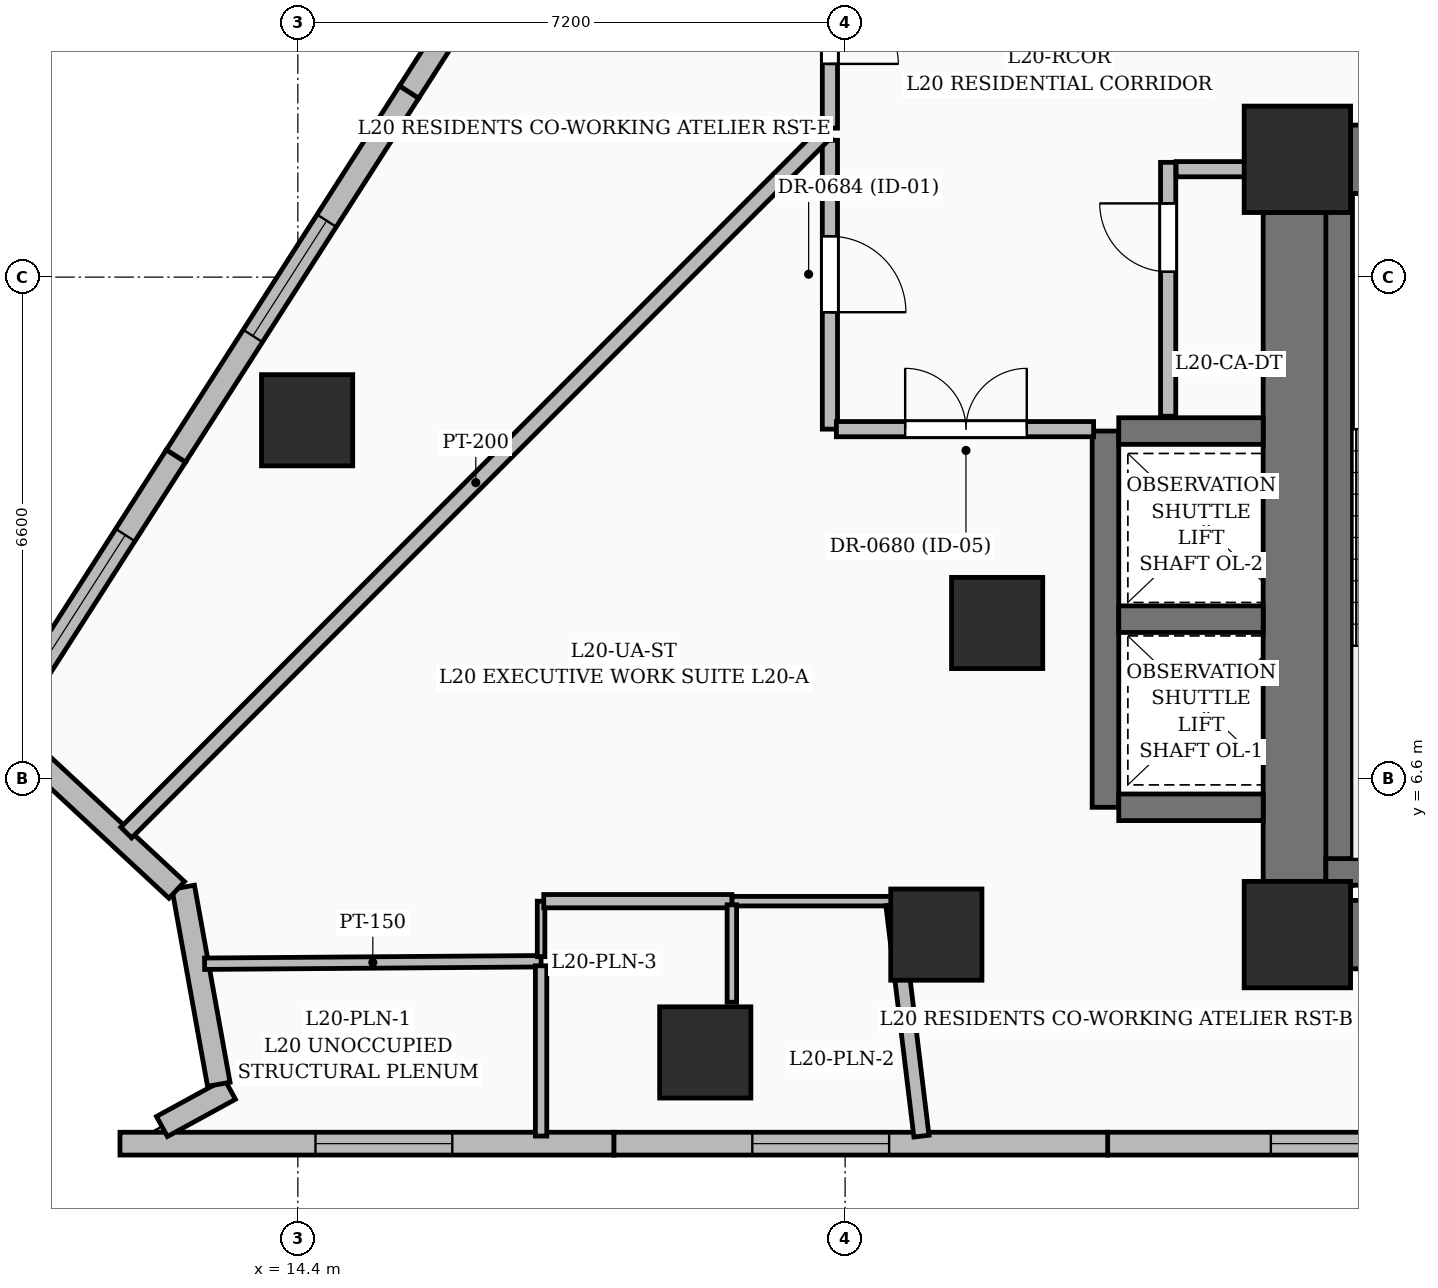
"""IFC4 building model, lengths in metres.
Left out: names, types, materials, properties, quantities, classifications, styles, units other than length and angle.
Written with IfcOpenShell. Run it as: python <this file> out.ifc"""

import sys

from ifc_helpers import new_model, si_unit, direction, frame, frame_2d, origin, origin_2d, place, context, subcontext, project, spatial, rectangle, extrude, element, fill, save


model = new_model("IFC4")
c1 = context("Model", 3, precision=1e-05, world=origin(), true_north=direction((0.0, 1.0)))
c2 = subcontext(c1, "Body", "Model", "MODEL_VIEW")
j1 = project(units=[si_unit("LENGTHUNIT", "METRE"), si_unit("PLANEANGLEUNIT", "RADIAN")], contexts=[c1])
p1 = place(None, origin())
s1 = spatial("IfcSite", under=j1, at=p1, CompositionType="ELEMENT")
p2 = place(p1, origin())
s2 = spatial("IfcBuilding", under=s1, at=p2, CompositionType="ELEMENT")
p3 = place(p2, frame((0.0, 0.0, 82.2)))
s3 = spatial("IfcBuildingStorey", under=s2, at=p3, CompositionType="ELEMENT", Elevation=82.2)
for number, where, z_axis, x_axis in (
    (1, (27.55, 4.55, 0.0), (0.0, 0.0, 1.0), (1.0, 0.0, 0.0)),
    (2, (27.55, 14.75, 0.0), (0.0, 0.0, 1.0), (1.0, 0.0, 0.0)),
):
    element("IfcColumn", number, at=place(p3, frame(where, z_axis=z_axis, x_axis=x_axis)), inside=s3, PredefinedType="COLUMN", context=c2, shape_type="SweptSolid", body=[
        extrude(rectangle(XDim=1.4, YDim=1.4, at=origin_2d()), origin(), (0.0, 0.0, 1.0), 3.6),
    ])
for number, where, z_axis, x_axis in (
    (3, (22.8, 4.55, 0.0), (0.0, 0.0, 1.0), (1.0, 0.0, 0.0)),
    (4, (23.6, 8.65, 0.0), (0.0, 0.0, 1.0), (1.0, 0.0, 0.0)),
):
    element("IfcColumn", number, at=place(p3, frame(where, z_axis=z_axis, x_axis=x_axis)), inside=s3, PredefinedType="COLUMN", context=c2, shape_type="SweptSolid", body=[
        extrude(rectangle(XDim=1.2, YDim=1.2, at=origin_2d()), origin(), (0.0, 0.0, 1.0), 3.6),
    ])
p4 = place(p3, frame((28.25, 4.55, 0.0), z_axis=(0.0, 0.0, 1.0), x_axis=(1.0, 0.0, 0.0)))
e5 = element("IfcWall", 5, at=p4, inside=s3, PredefinedType="SHEAR", context=c2, shape_type="SweptSolid", body=[
    extrude(rectangle(XDim=6.2, YDim=0.9, at=frame_2d((3.1, 0.0))), origin(), (0.0, 0.0, 1.0), 3.6),
])
p5 = place(p3, frame((28.25, 14.75, 0.0), z_axis=(0.0, 0.0, 1.0), x_axis=(1.0, 0.0, 0.0)))
e6 = element("IfcWall", 6, at=p5, inside=s3, PredefinedType="SHEAR", context=c2, shape_type="SweptSolid", body=[
    extrude(rectangle(XDim=6.2, YDim=0.9, at=frame_2d((3.1, 0.0))), origin(), (0.0, 0.0, 1.0), 3.6),
])
p6 = place(p5, frame((0.925, 0.0, 0.0)))
e7 = element("IfcOpeningElement", 7, at=p6, cuts=e6, PredefinedType="OPENING", context=c2, shape_type="SweptSolid", body=[
    extrude(rectangle(XDim=1.05, YDim=2.15, at=frame_2d((0.525, 1.075))), frame((0.0, 0.46, 0.0), z_axis=(0.0, -1.0, 0.0), x_axis=(1.0, 0.0, 0.0)), (0.0, 0.0, 1.0), 0.92),
])
p7 = place(p3, frame((27.55, 5.25, 0.0), z_axis=(0.0, 0.0, 1.0), x_axis=(0.0, 1.0, 0.0)))
e8 = element("IfcWall", 8, at=p7, inside=s3, PredefinedType="SHEAR", context=c2, shape_type="SweptSolid", body=[
    extrude(rectangle(XDim=8.8, YDim=0.9, at=frame_2d((4.4, 0.0))), origin(), (0.0, 0.0, 1.0), 3.6),
])
p8 = place(p3, frame((28.1, 5.2, 0.0), z_axis=(0.0, 0.0, 1.0), x_axis=(0.0, 1.0, 0.0)))
e9 = element("IfcWall", 9, at=p8, inside=s3, PredefinedType="SOLIDWALL", context=c2, shape_type="SweptSolid", body=[
    extrude(rectangle(XDim=9.1, YDim=0.35, at=frame_2d((4.55, 0.0))), origin(), (0.0, 0.0, 1.0), 3.6),
])
p9 = place(p3, frame((27.925, 5.375, 0.0), z_axis=(0.0, 0.0, 1.0), x_axis=(1.0, 0.0, 0.0)))
e10 = element("IfcWall", 10, at=p9, inside=s3, PredefinedType="SOLIDWALL", context=c2, shape_type="SweptSolid", body=[
    extrude(rectangle(XDim=3.55, YDim=0.35, at=frame_2d((1.775, 0.0))), origin(), (0.0, 0.0, 1.0), 3.6),
])
p10 = place(p3, frame((25.025, 6.225, 0.0), z_axis=(0.0, 0.0, 1.0), x_axis=(0.0, 1.0, 0.0)))
e11 = element("IfcWall", 11, at=p10, inside=s3, PredefinedType="SOLIDWALL", context=c2, shape_type="SweptSolid", body=[
    extrude(rectangle(XDim=4.95, YDim=0.35, at=frame_2d((2.475, 0.0))), origin(), (0.0, 0.0, 1.0), 3.6),
])
for number, where, z_axis, x_axis in (
    (12, (25.2, 6.225, 0.0), (0.0, 0.0, 1.0), (1.0, 0.0, 0.0)),
    (13, (25.2, 8.7, 0.0), (0.0, 0.0, 1.0), (1.0, 0.0, 0.0)),
    (14, (25.2, 11.175, 0.0), (0.0, 0.0, 1.0), (1.0, 0.0, 0.0)),
):
    element("IfcWall", number, at=place(p3, frame(where, z_axis=z_axis, x_axis=x_axis)), inside=s3, PredefinedType="SOLIDWALL", context=c2, shape_type="SweptSolid", body=[
        extrude(rectangle(XDim=1.9, YDim=0.35, at=frame_2d((0.95, 0.0))), origin(), (0.0, 0.0, 1.0), 3.6),
    ])
for number, where, z_axis, x_axis in (
    (15, (19.76, 3.0, 0.0), (0.0, 0.0, 1.0), (1.0, 0.0, 0.0)),
    (16, (14.522, 11.317, 0.0), (0.0, 0.0, 1.0), (1.0, 0.0, 0.0)),
):
    element("IfcColumn", number, at=place(p3, frame(where, z_axis=z_axis, x_axis=x_axis)), inside=s3, PredefinedType="COLUMN", context=c2, shape_type="SweptSolid", body=[
        extrude(rectangle(XDim=1.2, YDim=1.2, at=origin_2d()), origin(), (0.0, 0.0, 1.0), 3.6),
    ])
p11 = place(p3, frame((31.551, 1.8, 0.0), z_axis=(0.0, 0.0, 1.0), x_axis=(-1.0, 0.0, 0.0)))
e17 = element("IfcWall", 17, at=p11, inside=s3, PredefinedType="SOLIDWALL", context=c2, shape_type="SweptSolid", body=[
    extrude(rectangle(XDim=6.497, YDim=0.3, at=frame_2d((3.249, 0.0))), origin(), (0.0, 0.0, 1.0), 3.35),
])
p12 = place(p11, frame((1.95, 0.0, 0.6)))
e18 = element("IfcOpeningElement", 18, at=p12, cuts=e17, PredefinedType="OPENING", context=c2, shape_type="SweptSolid", body=[
    extrude(rectangle(XDim=2.4, YDim=2.1, at=frame_2d((1.2, 1.05))), frame((0.0, 0.16, 0.0), z_axis=(0.0, -1.0, 0.0), x_axis=(1.0, 0.0, 0.0)), (0.0, 0.0, 1.0), 0.32),
])
p13 = place(p3, frame((25.054, 1.8, 0.0), z_axis=(0.0, 0.0, 1.0), x_axis=(-1.0, 0.0, 0.0)))
e19 = element("IfcWall", 19, at=p13, inside=s3, PredefinedType="SOLIDWALL", context=c2, shape_type="SweptSolid", body=[
    extrude(rectangle(XDim=6.497, YDim=0.3, at=frame_2d((3.249, 0.0))), origin(), (0.0, 0.0, 1.0), 3.35),
])
p14 = place(p13, frame((2.875, 0.0, 0.6)))
e20 = element("IfcOpeningElement", 20, at=p14, cuts=e19, PredefinedType="OPENING", context=c2, shape_type="SweptSolid", body=[
    extrude(rectangle(XDim=1.8, YDim=2.1, at=frame_2d((0.9, 1.05))), frame((0.0, 0.16, 0.0), z_axis=(0.0, -1.0, 0.0), x_axis=(1.0, 0.0, 0.0)), (0.0, 0.0, 1.0), 0.32),
])
p15 = place(p3, frame((18.557, 1.8, 0.0), z_axis=(0.0, 0.0, 1.0), x_axis=(-1.0, 0.0, 0.0)))
e21 = element("IfcWall", 21, at=p15, inside=s3, PredefinedType="SOLIDWALL", context=c2, shape_type="SweptSolid", body=[
    extrude(rectangle(XDim=6.497, YDim=0.3, at=frame_2d((3.249, 0.0))), origin(), (0.0, 0.0, 1.0), 3.35),
])
p16 = place(p15, frame((2.125, 0.0, 0.6)))
e22 = element("IfcOpeningElement", 22, at=p16, cuts=e21, PredefinedType="OPENING", context=c2, shape_type="SweptSolid", body=[
    extrude(rectangle(XDim=1.8, YDim=2.1, at=frame_2d((0.9, 1.05))), frame((0.0, 0.16, 0.0), z_axis=(0.0, -1.0, 0.0), x_axis=(1.0, 0.0, 0.0)), (0.0, 0.0, 1.0), 0.32),
])
p17 = place(p3, frame((12.612, 2.026, 0.0), z_axis=(0.0, 0.0, 1.0), x_axis=(0.877245120991, 0.480042704036, 0.0)))
e23 = element("IfcWall", 23, at=p17, inside=s3, PredefinedType="SOLIDWALL", context=c2, shape_type="SweptSolid", body=[
    extrude(rectangle(XDim=1.02, YDim=0.3, at=frame_2d((0.51, 0.0))), origin(), (0.0, 0.0, 1.0), 3.35),
])
p18 = place(p3, frame((13.36, 2.581, 0.0), z_axis=(0.0, 0.0, 1.0), x_axis=(-0.177621463404, 0.984098885142, 0.0)))
e24 = element("IfcWall", 24, at=p18, inside=s3, PredefinedType="SOLIDWALL", context=c2, shape_type="SweptSolid", body=[
    extrude(rectangle(XDim=2.635, YDim=0.3, at=frame_2d((1.317, 0.0))), origin(), (0.0, 0.0, 1.0), 3.35),
])
p19 = place(p3, frame((12.807, 5.138, 0.0), z_axis=(0.0, 0.0, 1.0), x_axis=(-0.732670686937, 0.680583326642, 0.0)))
e25 = element("IfcWall", 25, at=p19, inside=s3, PredefinedType="SOLIDWALL", context=c2, shape_type="SweptSolid", body=[
    extrude(rectangle(XDim=2.62, YDim=0.3, at=frame_2d((1.31, 0.0))), origin(), (0.0, 0.0, 1.0), 3.35),
])
p20 = place(p3, frame((10.061, 6.578, 0.0), z_axis=(0.0, 0.0, 1.0), x_axis=(0.539464859434, 0.842008114828, 0.0)))
e26 = element("IfcWall", 26, at=p20, inside=s3, PredefinedType="SOLIDWALL", context=c2, shape_type="SweptSolid", body=[
    extrude(rectangle(XDim=5.071, YDim=0.3, at=frame_2d((2.536, 0.0))), origin(), (0.0, 0.0, 1.0), 3.35),
])
p21 = place(p20, frame((1.735, 0.0, 0.55)))
e27 = element("IfcOpeningElement", 27, at=p21, cuts=e26, PredefinedType="OPENING", context=c2, shape_type="SweptSolid", body=[
    extrude(rectangle(XDim=2.1, YDim=2.4, at=frame_2d((1.05, 1.2))), frame((0.0, 0.16, 0.0), z_axis=(0.0, -1.0, 0.0), x_axis=(1.0, 0.0, 0.0)), (0.0, 0.0, 1.0), 0.32),
])
p22 = place(p3, frame((12.797, 10.848, 0.0), z_axis=(0.0, 0.0, 1.0), x_axis=(0.539467898562, 0.842006167686, 0.0)))
e28 = element("IfcWall", 28, at=p22, inside=s3, PredefinedType="SOLIDWALL", context=c2, shape_type="SweptSolid", body=[
    extrude(rectangle(XDim=5.686, YDim=0.3, at=frame_2d((2.843, 0.0))), origin(), (0.0, 0.0, 1.0), 3.35),
])
p23 = place(p22, frame((1.875, 0.0, 0.6)))
e29 = element("IfcOpeningElement", 29, at=p23, cuts=e28, PredefinedType="OPENING", context=c2, shape_type="SweptSolid", body=[
    extrude(rectangle(XDim=1.8, YDim=2.1, at=frame_2d((0.9, 1.05))), frame((0.0, 0.16, 0.0), z_axis=(0.0, -1.0, 0.0), x_axis=(1.0, 0.0, 0.0)), (0.0, 0.0, 1.0), 0.32),
])
p24 = place(p3, frame((15.864, 15.635, 0.0), z_axis=(0.0, 0.0, 1.0), x_axis=(0.53944798429, 0.842018926299, 0.0)))
e30 = element("IfcWall", 30, at=p24, inside=s3, PredefinedType="SOLIDWALL", context=c2, shape_type="SweptSolid", body=[
    extrude(rectangle(XDim=5.411, YDim=0.3, at=frame_2d((2.706, 0.0))), origin(), (0.0, 0.0, 1.0), 3.35),
])
p25 = place(p24, frame((1.975, 0.0, 0.55)))
e31 = element("IfcOpeningElement", 31, at=p25, cuts=e30, PredefinedType="OPENING", context=c2, shape_type="SweptSolid", body=[
    extrude(rectangle(XDim=1.6, YDim=2.2, at=frame_2d((0.8, 1.1))), frame((0.0, 0.16, 0.0), z_axis=(0.0, -1.0, 0.0), x_axis=(1.0, 0.0, 0.0)), (0.0, 0.0, 1.0), 0.32),
])
p26 = place(p3, frame((25.85, 11.37, 0.0), z_axis=(0.0, 0.0, 1.0), x_axis=(0.0, 1.0, 0.0)))
e32 = element("IfcWall", 32, at=p26, inside=s3, PredefinedType="PARTITIONING", context=c2, shape_type="SweptSolid", body=[
    extrude(rectangle(XDim=3.34, YDim=0.2, at=frame_2d((1.67, 0.0))), origin(), (0.0, 0.0, 1.0), 3.35),
])
p27 = place(p26, frame((1.9, 0.0, 0.0)))
e33 = element("IfcOpeningElement", 33, at=p27, cuts=e32, PredefinedType="OPENING", context=c2, shape_type="SweptSolid", body=[
    extrude(rectangle(XDim=0.9, YDim=2.1, at=frame_2d((0.45, 1.05))), frame((0.0, 0.11, 0.0), z_axis=(0.0, -1.0, 0.0), x_axis=(1.0, 0.0, 0.0)), (0.0, 0.0, 1.0), 0.22),
])
p28 = place(p3, frame((25.955, 14.62, 0.0), z_axis=(0.0, 0.0, 1.0), x_axis=(1.0, 0.0, 0.0)))
e34 = element("IfcWall", 34, at=p28, inside=s3, PredefinedType="PARTITIONING", context=c2, shape_type="SweptSolid", body=[
    extrude(rectangle(XDim=1.13, YDim=0.2, at=frame_2d((0.565, 0.0))), origin(), (0.0, 0.0, 1.0), 3.35),
])
p29 = place(p3, frame((21.4, 15.0, 0.0), z_axis=(0.0, 0.0, 1.0), x_axis=(0.0, -1.0, 0.0)))
e35 = element("IfcWall", 35, at=p29, inside=s3, PredefinedType="PARTITIONING", context=c2, shape_type="SweptSolid", body=[
    extrude(rectangle(XDim=3.8, YDim=0.2, at=frame_2d((1.9, 0.0))), origin(), (0.0, 0.0, 1.0), 2.709),
])
p30 = place(p29, frame((1.262, 0.0, 0.0)))
e36 = element("IfcOpeningElement", 36, at=p30, cuts=e35, PredefinedType="OPENING", context=c2, shape_type="SweptSolid", body=[
    extrude(rectangle(XDim=1.0, YDim=2.2, at=frame_2d((0.5, 1.1))), frame((0.0, 0.11, 0.0), z_axis=(0.0, -1.0, 0.0), x_axis=(1.0, 0.0, 0.0)), (0.0, 0.0, 1.0), 0.22),
])
p31 = place(p3, frame((21.485, 11.2, 0.0), z_axis=(0.0, 0.0, 1.0), x_axis=(1.0, 0.0, 0.0)))
e37 = element("IfcWall", 37, at=p31, inside=s3, PredefinedType="PARTITIONING", context=c2, shape_type="SweptSolid", body=[
    extrude(rectangle(XDim=3.384, YDim=0.2, at=frame_2d((1.692, 0.0))), origin(), (0.0, 0.0, 1.0), 3.35),
])
p32 = place(p31, frame((0.905, 0.0, 0.0)))
e38 = element("IfcOpeningElement", 38, at=p32, cuts=e37, PredefinedType="OPENING", context=c2, shape_type="SweptSolid", body=[
    extrude(rectangle(XDim=1.6, YDim=2.3, at=frame_2d((0.8, 1.15))), frame((0.0, 0.11, 0.0), z_axis=(0.0, -1.0, 0.0), x_axis=(1.0, 0.0, 0.0)), (0.0, 0.0, 1.0), 0.22),
])
p33 = place(p3, frame((21.4, 17.75, 0.0), z_axis=(0.0, 0.0, 1.0), x_axis=(0.0, -1.0, 0.0)))
e39 = element("IfcWall", 39, at=p33, inside=s3, PredefinedType="PARTITIONING", context=c2, shape_type="SweptSolid", body=[
    extrude(rectangle(XDim=2.59, YDim=0.2, at=frame_2d((1.295, 0.0))), origin(), (0.0, 0.0, 1.0), 2.709),
])
p34 = place(p33, frame((0.845, 0.0, 0.0)))
e40 = element("IfcOpeningElement", 40, at=p34, cuts=e39, PredefinedType="OPENING", context=c2, shape_type="SweptSolid", body=[
    extrude(rectangle(XDim=0.9, YDim=2.1, at=frame_2d((0.45, 1.05))), frame((0.0, 0.11, 0.0), z_axis=(0.0, -1.0, 0.0), x_axis=(1.0, 0.0, 0.0)), (0.0, 0.0, 1.0), 0.22),
])
p35 = place(p3, frame((13.173, 4.167, 0.0), z_axis=(0.0, 0.0, 1.0), x_axis=(0.999972287215, 0.007444783476, 0.0)))
e41 = element("IfcWall", 41, at=p35, inside=s3, PredefinedType="PARTITIONING", context=c2, shape_type="SweptSolid", body=[
    extrude(rectangle(XDim=4.427, YDim=0.15, at=frame_2d((2.214, 0.0))), origin(), (0.0, 0.0, 1.0), 3.35),
])
p36 = place(p3, frame((20.11, 4.99, 0.0), z_axis=(0.0, 0.0, 1.0), x_axis=(1.0, 0.0, 0.0)))
e42 = element("IfcWall", 42, at=p36, inside=s3, PredefinedType="PARTITIONING", context=c2, shape_type="SweptSolid", body=[
    extrude(rectangle(XDim=2.12, YDim=0.125, at=frame_2d((1.06, 0.0))), origin(), (0.0, 0.0, 1.0), 2.709),
])
p37 = place(p3, frame((17.6, 4.26, 0.0), z_axis=(0.0, 0.0, 1.0), x_axis=(0.0, 1.0, 0.0)))
e43 = element("IfcWall", 43, at=p37, inside=s3, PredefinedType="PARTITIONING", context=c2, shape_type="SweptSolid", body=[
    extrude(rectangle(XDim=0.73, YDim=0.1, at=frame_2d((0.365, 0.0))), origin(), (0.0, 0.0, 1.0), 3.35),
])
p38 = place(p3, frame((17.635, 4.99, 0.0), z_axis=(0.0, 0.0, 1.0), x_axis=(1.0, 0.0, 0.0)))
e44 = element("IfcWall", 44, at=p38, inside=s3, PredefinedType="PARTITIONING", context=c2, shape_type="SweptSolid", body=[
    extrude(rectangle(XDim=2.475, YDim=0.175, at=frame_2d((1.238, 0.0))), origin(), (0.0, 0.0, 1.0), 2.37),
])
p39 = place(p3, frame((21.34, 15.1, 0.0), z_axis=(0.0, 0.0, 1.0), x_axis=(-0.706759638276, -0.707453753756, 0.0)))
e45 = element("IfcWall", 45, at=p39, inside=s3, PredefinedType="PARTITIONING", context=c2, shape_type="SweptSolid", body=[
    extrude(rectangle(XDim=13.014, YDim=0.2, at=frame_2d((6.507, 0.0))), origin(), (0.0, 0.0, 1.0), 2.345),
])
p40 = place(p3, frame((17.6, 1.9, 0.0), z_axis=(0.0, 0.0, 1.0), x_axis=(0.0, 1.0, 0.0)))
e46 = element("IfcWall", 46, at=p40, inside=s3, PredefinedType="PARTITIONING", context=c2, shape_type="SweptSolid", body=[
    extrude(rectangle(XDim=2.24, YDim=0.15, at=frame_2d((1.12, 0.0))), origin(), (0.0, 0.0, 1.0), 3.35),
])
p41 = place(p3, frame((20.11, 4.942, 0.0), z_axis=(0.0, 0.0, 1.0), x_axis=(0.0, -1.0, 0.0)))
e47 = element("IfcWall", 47, at=p41, inside=s3, PredefinedType="PARTITIONING", context=c2, shape_type="SweptSolid", body=[
    extrude(rectangle(XDim=1.282, YDim=0.125, at=frame_2d((0.641, 0.0))), origin(), (0.0, 0.0, 1.0), 2.709),
])
p42 = place(p3, frame((22.604, 1.899, 0.0), z_axis=(0.0, 0.0, 1.0), x_axis=(-0.120074545748, 0.992764878238, 0.0)))
e48 = element("IfcWall", 48, at=p42, inside=s3, PredefinedType="PARTITIONING", context=c2, shape_type="SweptSolid", body=[
    extrude(rectangle(XDim=3.066, YDim=0.2, at=frame_2d((1.533, 0.0))), origin(), (0.0, 0.0, 1.0), 2.345),
])
p43 = place(p12, origin())
e49 = element("IfcWindow", 49, at=p43, inside=s3, PartitioningType="SINGLE_PANEL", PredefinedType="WINDOW", context=c2, shape_type="SweptSolid", body=[
    extrude(rectangle(XDim=2.4, YDim=2.1, at=frame_2d((1.2, 1.05))), frame((0.0, 0.03, 0.0), z_axis=(0.0, -1.0, 0.0), x_axis=(1.0, 0.0, 0.0)), (0.0, 0.0, 1.0), 0.06),
])
fill(e18, e49)
p44 = place(p14, origin())
e50 = element("IfcWindow", 50, at=p44, inside=s3, PartitioningType="SINGLE_PANEL", PredefinedType="WINDOW", context=c2, shape_type="SweptSolid", body=[
    extrude(rectangle(XDim=1.8, YDim=2.1, at=frame_2d((0.9, 1.05))), frame((0.0, 0.03, 0.0), z_axis=(0.0, -1.0, 0.0), x_axis=(1.0, 0.0, 0.0)), (0.0, 0.0, 1.0), 0.06),
])
fill(e20, e50)
p45 = place(p16, origin())
e51 = element("IfcWindow", 51, at=p45, inside=s3, PartitioningType="SINGLE_PANEL", PredefinedType="WINDOW", context=c2, shape_type="SweptSolid", body=[
    extrude(rectangle(XDim=1.8, YDim=2.1, at=frame_2d((0.9, 1.05))), frame((0.0, 0.03, 0.0), z_axis=(0.0, -1.0, 0.0), x_axis=(1.0, 0.0, 0.0)), (0.0, 0.0, 1.0), 0.06),
])
fill(e22, e51)
p46 = place(p21, origin())
e52 = element("IfcWindow", 52, at=p46, inside=s3, PartitioningType="SINGLE_PANEL", PredefinedType="WINDOW", context=c2, shape_type="SweptSolid", body=[
    extrude(rectangle(XDim=2.1, YDim=2.4, at=frame_2d((1.05, 1.2))), frame((0.0, 0.03, 0.0), z_axis=(0.0, -1.0, 0.0), x_axis=(1.0, 0.0, 0.0)), (0.0, 0.0, 1.0), 0.06),
])
fill(e27, e52)
p47 = place(p23, origin())
e53 = element("IfcWindow", 53, at=p47, inside=s3, PartitioningType="SINGLE_PANEL", PredefinedType="WINDOW", context=c2, shape_type="SweptSolid", body=[
    extrude(rectangle(XDim=1.8, YDim=2.1, at=frame_2d((0.9, 1.05))), frame((0.0, 0.03, 0.0), z_axis=(0.0, -1.0, 0.0), x_axis=(1.0, 0.0, 0.0)), (0.0, 0.0, 1.0), 0.06),
])
fill(e29, e53)
p48 = place(p27, origin())
e54 = element("IfcDoor", 54, at=p48, inside=s3, OperationType="SINGLE_SWING_RIGHT", PredefinedType="DOOR", context=c2, shape_type="SweptSolid", body=[
    extrude(rectangle(XDim=0.9, YDim=2.1, at=frame_2d((0.45, 1.05))), frame((0.0, 0.025, 0.0), z_axis=(0.0, -1.0, 0.0), x_axis=(1.0, 0.0, 0.0)), (0.0, 0.0, 1.0), 0.05),
])
fill(e33, e54)
p49 = place(p32, origin())
e55 = element("IfcDoor", 55, at=p49, inside=s3, OperationType="DOUBLE_DOOR_SINGLE_SWING", PredefinedType="DOOR", context=c2, shape_type="SweptSolid", body=[
    extrude(rectangle(XDim=1.6, YDim=2.3, at=frame_2d((0.8, 1.15))), frame((0.0, 0.025, 0.0), z_axis=(0.0, -1.0, 0.0), x_axis=(1.0, 0.0, 0.0)), (0.0, 0.0, 1.0), 0.05),
])
fill(e38, e55)
p50 = place(p34, origin())
e56 = element("IfcDoor", 56, at=p50, inside=s3, OperationType="SINGLE_SWING_RIGHT", PredefinedType="DOOR", context=c2, shape_type="SweptSolid", body=[
    extrude(rectangle(XDim=0.9, YDim=2.1, at=frame_2d((0.45, 1.05))), frame((0.0, 0.025, 0.0), z_axis=(0.0, -1.0, 0.0), x_axis=(1.0, 0.0, 0.0)), (0.0, 0.0, 1.0), 0.05),
])
fill(e40, e56)
p51 = place(p30, origin())
e57 = element("IfcDoor", 57, at=p51, inside=s3, OperationType="SINGLE_SWING_RIGHT", PredefinedType="DOOR", context=c2, shape_type="SweptSolid", body=[
    extrude(rectangle(XDim=1.0, YDim=2.2, at=frame_2d((0.5, 1.1))), frame((0.0, 0.025, 0.0), z_axis=(0.0, -1.0, 0.0), x_axis=(1.0, 0.0, 0.0)), (0.0, 0.0, 1.0), 0.05),
])
fill(e36, e57)
save(model, sys.argv[1])
